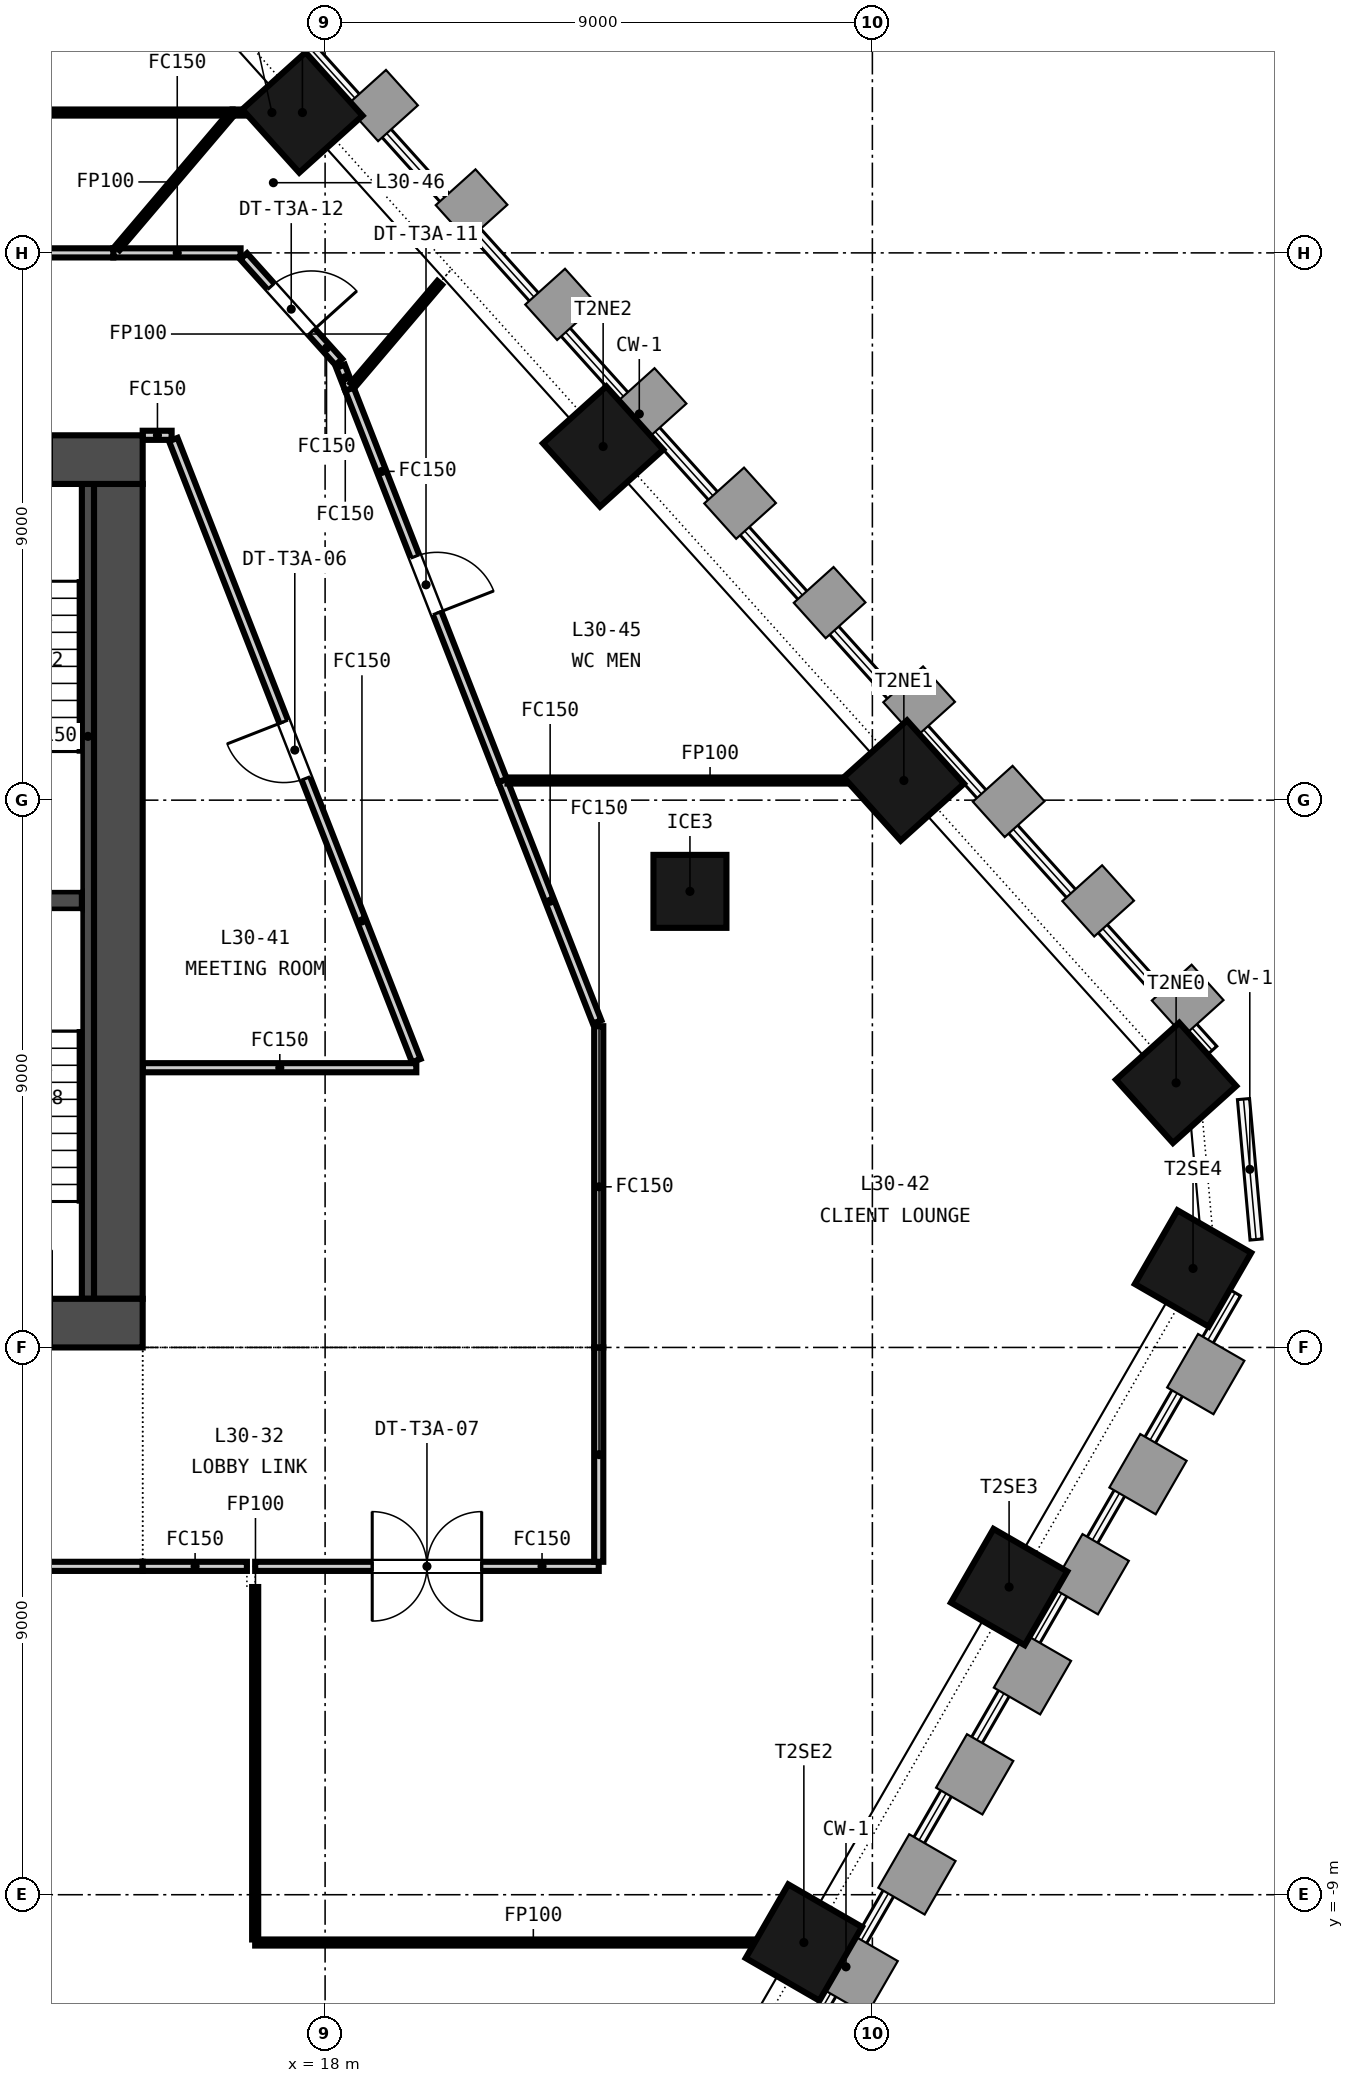
"""IFC4 building model, lengths in metres.
Left out: names, types, materials, properties, quantities, classifications, styles, units other than length and angle.
Written with IfcOpenShell. Run it as: python <this file> out.ifc"""

import sys

from ifc_helpers import new_model, si_unit, direction, frame, frame_2d, origin, origin_2d, place, context, subcontext, project, spatial, rectangle, extrude, element, fill, save


model = new_model("IFC4")
c1 = context("Model", 3, precision=1e-05, world=origin(), true_north=direction((0.0, 1.0)))
c2 = subcontext(c1, "Body", "Model", "MODEL_VIEW")
j1 = project(units=[si_unit("LENGTHUNIT", "METRE"), si_unit("PLANEANGLEUNIT", "RADIAN")], contexts=[c1])
p1 = place(None, origin())
s1 = spatial("IfcSite", under=j1, at=p1, CompositionType="ELEMENT")
p2 = place(p1, origin())
s2 = spatial("IfcBuilding", under=s1, at=p2, CompositionType="ELEMENT")
p3 = place(p2, frame((0.0, 0.0, 126.15)))
s3 = spatial("IfcBuildingStorey", under=s2, at=p3, CompositionType="ELEMENT", Elevation=126.15)
p4 = place(p3, frame((-15.0, 0.4, -0.15), z_axis=(0.0, 0.0, 1.0), x_axis=(1.0, 0.0, 0.0)))
e1 = element("IfcWall", 1, at=p4, inside=s3, PredefinedType="SOLIDWALL", context=c2, shape_type="SweptSolid", body=[
    extrude(rectangle(XDim=30.0, YDim=0.8, at=frame_2d((15.0, 0.0))), origin(), (0.0, 0.0, 1.0), 3.65),
])
p5 = place(p4, frame((5.8, 0.0, 0.15)))
e2 = element("IfcOpeningElement", 2, at=p5, cuts=e1, PredefinedType="OPENING", context=c2, shape_type="SweptSolid", body=[
    extrude(rectangle(XDim=2.4, YDim=2.4, at=frame_2d((1.2, 1.2))), frame((0.0, 0.41, 0.0), z_axis=(0.0, -1.0, 0.0), x_axis=(1.0, 0.0, 0.0)), (0.0, 0.0, 1.0), 0.82),
])
p6 = place(p4, frame((13.8, 0.0, 0.15)))
e3 = element("IfcOpeningElement", 3, at=p6, cuts=e1, PredefinedType="OPENING", context=c2, shape_type="SweptSolid", body=[
    extrude(rectangle(XDim=2.4, YDim=2.4, at=frame_2d((1.2, 1.2))), frame((0.0, 0.41, 0.0), z_axis=(0.0, -1.0, 0.0), x_axis=(1.0, 0.0, 0.0)), (0.0, 0.0, 1.0), 0.82),
])
p7 = place(p4, frame((21.8, 0.0, 0.15)))
e4 = element("IfcOpeningElement", 4, at=p7, cuts=e1, PredefinedType="OPENING", context=c2, shape_type="SweptSolid", body=[
    extrude(rectangle(XDim=2.4, YDim=2.4, at=frame_2d((1.2, 1.2))), frame((0.0, 0.41, 0.0), z_axis=(0.0, -1.0, 0.0), x_axis=(1.0, 0.0, 0.0)), (0.0, 0.0, 1.0), 0.82),
])
p8 = place(p4, frame((1.5, 0.0, 0.15)))
e5 = element("IfcOpeningElement", 5, at=p8, cuts=e1, PredefinedType="OPENING", context=c2, shape_type="SweptSolid", body=[
    extrude(rectangle(XDim=1.2, YDim=2.1, at=frame_2d((0.6, 1.05))), frame((0.0, 0.41, 0.0), z_axis=(0.0, -1.0, 0.0), x_axis=(1.0, 0.0, 0.0)), (0.0, 0.0, 1.0), 0.82),
])
p9 = place(p4, frame((27.3, 0.0, 0.15)))
e6 = element("IfcOpeningElement", 6, at=p9, cuts=e1, PredefinedType="OPENING", context=c2, shape_type="SweptSolid", body=[
    extrude(rectangle(XDim=1.2, YDim=2.1, at=frame_2d((0.6, 1.05))), frame((0.0, 0.41, 0.0), z_axis=(0.0, -1.0, 0.0), x_axis=(1.0, 0.0, 0.0)), (0.0, 0.0, 1.0), 0.82),
])
p10 = place(p3, frame((-15.0, 14.6, -0.15), z_axis=(0.0, 0.0, 1.0), x_axis=(1.0, 0.0, 0.0)))
e7 = element("IfcWall", 7, at=p10, inside=s3, PredefinedType="SOLIDWALL", context=c2, shape_type="SweptSolid", body=[
    extrude(rectangle(XDim=30.0, YDim=0.8, at=frame_2d((15.0, 0.0))), origin(), (0.0, 0.0, 1.0), 3.65),
])
p11 = place(p10, frame((9.25, 0.0, 0.15)))
e8 = element("IfcOpeningElement", 8, at=p11, cuts=e7, PredefinedType="OPENING", context=c2, shape_type="SweptSolid", body=[
    extrude(rectangle(XDim=1.5, YDim=2.1, at=frame_2d((0.75, 1.05))), frame((0.0, 0.41, 0.0), z_axis=(0.0, -1.0, 0.0), x_axis=(1.0, 0.0, 0.0)), (0.0, 0.0, 1.0), 0.82),
])
p12 = place(p10, frame((19.4, 0.0, 0.15)))
e9 = element("IfcOpeningElement", 9, at=p12, cuts=e7, PredefinedType="OPENING", context=c2, shape_type="SweptSolid", body=[
    extrude(rectangle(XDim=1.5, YDim=2.1, at=frame_2d((0.75, 1.05))), frame((0.0, 0.41, 0.0), z_axis=(0.0, -1.0, 0.0), x_axis=(1.0, 0.0, 0.0)), (0.0, 0.0, 1.0), 0.82),
])
p13 = place(p10, frame((1.5, 0.0, 0.15)))
e10 = element("IfcOpeningElement", 10, at=p13, cuts=e7, PredefinedType="OPENING", context=c2, shape_type="SweptSolid", body=[
    extrude(rectangle(XDim=1.2, YDim=2.1, at=frame_2d((0.6, 1.05))), frame((0.0, 0.41, 0.0), z_axis=(0.0, -1.0, 0.0), x_axis=(1.0, 0.0, 0.0)), (0.0, 0.0, 1.0), 0.82),
])
p14 = place(p10, frame((27.3, 0.0, 0.15)))
e11 = element("IfcOpeningElement", 11, at=p14, cuts=e7, PredefinedType="OPENING", context=c2, shape_type="SweptSolid", body=[
    extrude(rectangle(XDim=1.2, YDim=2.1, at=frame_2d((0.6, 1.05))), frame((0.0, 0.41, 0.0), z_axis=(0.0, -1.0, 0.0), x_axis=(1.0, 0.0, 0.0)), (0.0, 0.0, 1.0), 0.82),
])
p15 = place(p3, frame((14.6, 0.8, -0.15), z_axis=(0.0, 0.0, 1.0), x_axis=(0.0, 1.0, 0.0)))
e12 = element("IfcWall", 12, at=p15, inside=s3, PredefinedType="SOLIDWALL", context=c2, shape_type="SweptSolid", body=[
    extrude(rectangle(XDim=13.4, YDim=0.8, at=frame_2d((6.7, 0.0))), origin(), (0.0, 0.0, 1.0), 3.65),
])
for number, where, z_axis, x_axis in (
    (13, (25.873, -9.786, -0.15), (0.0, 0.0, 1.0), (0.5, 0.866, 0.0)),
    (14, (29.248, -3.94, -0.15), (0.0, 0.0, 1.0), (0.5, 0.866, 0.0)),
    (15, (32.273, 1.299, -0.15), (0.0, 0.0, 1.0), (0.5, 0.866, 0.0)),
    (16, (31.995, 4.351, -0.15), (0.0, 0.0, 1.0), (-0.669, 0.743, 0.0)),
    (17, (27.518, 9.323, -0.15), (0.0, 0.0, 1.0), (-0.669, 0.743, 0.0)),
    (18, (22.573, 14.816, -0.15), (0.0, 0.0, 1.0), (-0.669, 0.743, 0.0)),
    (19, (17.627, 20.308, -0.15), (0.0, 0.0, 1.0), (-0.669, 0.743, 0.0)),
):
    element("IfcColumn", number, at=place(p3, frame(where, z_axis=z_axis, x_axis=x_axis)), inside=s3, PredefinedType="COLUMN", context=c2, shape_type="SweptSolid", body=[
        extrude(rectangle(XDim=1.4, YDim=1.4, at=origin_2d()), origin(), (0.0, 0.0, 1.0), 3.65),
    ])
p16 = place(p3, frame((24.0, 7.5, -0.15), z_axis=(0.0, 0.0, 1.0), x_axis=(1.0, 0.0, 0.0)))
e20 = element("IfcColumn", 20, at=p16, inside=s3, PredefinedType="COLUMN", context=c2, shape_type="SweptSolid", body=[
    extrude(rectangle(XDim=1.2, YDim=1.2, at=origin_2d()), origin(), (0.0, 0.0, 1.0), 3.65),
])
p17 = place(p3, frame((11.05, 7.35, 0.0), z_axis=(0.0, 0.0, 1.0), x_axis=(1.0, 0.0, 0.0)))
e21 = element("IfcWall", 21, at=p17, inside=s3, PredefinedType="SOLIDWALL", context=c2, shape_type="SweptSolid", body=[
    extrude(rectangle(XDim=2.95, YDim=0.3, at=frame_2d((1.475, 0.0))), origin(), (0.0, 0.0, 1.0), 3.5),
])
p18 = place(p3, frame((14.1, 0.8, 0.0), z_axis=(0.0, 0.0, 1.0), x_axis=(0.0, 1.0, 0.0)))
e22 = element("IfcWall", 22, at=p18, inside=s3, PredefinedType="SOLIDWALL", context=c2, shape_type="SweptSolid", body=[
    extrude(rectangle(XDim=13.4, YDim=0.2, at=frame_2d((6.7, 0.0))), origin(), (0.0, 0.0, 1.0), 3.5),
])
p19 = place(p3, frame((15.0, -3.6, 0.0), z_axis=(0.0, 0.0, 1.0), x_axis=(-1.0, 0.0, 0.0)))
e23 = element("IfcWall", 23, at=p19, inside=s3, PredefinedType="PARTITIONING", context=c2, shape_type="SweptSolid", body=[
    extrude(rectangle(XDim=30.0, YDim=0.15, at=frame_2d((15.0, 0.0))), origin(), (0.0, 0.0, 1.0), 2.741),
])
p20 = place(p19, frame((14.1, 0.0, 0.0)))
e24 = element("IfcOpeningElement", 24, at=p20, cuts=e23, PredefinedType="OPENING", context=c2, shape_type="SweptSolid", body=[
    extrude(rectangle(XDim=1.8, YDim=2.1, at=frame_2d((0.9, 1.05))), frame((0.0, 0.085, 0.0), z_axis=(0.0, -1.0, 0.0), x_axis=(1.0, 0.0, 0.0)), (0.0, 0.0, 1.0), 0.17),
])
p21 = place(p3, frame((22.5, -3.6, 0.0), z_axis=(0.0, 0.0, 1.0), x_axis=(-1.0, 0.0, 0.0)))
e25 = element("IfcWall", 25, at=p21, inside=s3, PredefinedType="PARTITIONING", context=c2, shape_type="SweptSolid", body=[
    extrude(rectangle(XDim=5.65, YDim=0.15, at=frame_2d((2.825, 0.0))), origin(), (0.0, 0.0, 1.0), 2.741),
])
p22 = place(p21, frame((1.925, 0.0, 0.0)))
e26 = element("IfcOpeningElement", 26, at=p22, cuts=e25, PredefinedType="OPENING", context=c2, shape_type="SweptSolid", body=[
    extrude(rectangle(XDim=1.8, YDim=2.1, at=frame_2d((0.9, 1.05))), frame((0.0, 0.085, 0.0), z_axis=(0.0, -1.0, 0.0), x_axis=(1.0, 0.0, 0.0)), (0.0, 0.0, 1.0), 0.17),
])
p23 = place(p3, frame((22.5, 0.0, 0.0), z_axis=(0.0, 0.0, 1.0), x_axis=(0.0, -1.0, 0.0)))
e27 = element("IfcWall", 27, at=p23, inside=s3, PredefinedType="PARTITIONING", context=c2, shape_type="SweptSolid", body=[
    extrude(rectangle(XDim=3.525, YDim=0.15, at=frame_2d((1.762, 0.0))), origin(), (0.0, 0.0, 1.0), 2.741),
])
p24 = place(p3, frame((16.714, -3.6, 0.0), z_axis=(0.0, 0.0, 1.0), x_axis=(-1.0, 0.0, 0.0)))
e28 = element("IfcWall", 28, at=p24, inside=s3, PredefinedType="PARTITIONING", context=c2, shape_type="SweptSolid", body=[
    extrude(rectangle(XDim=1.714, YDim=0.15, at=frame_2d((0.857, 0.0))), origin(), (0.0, 0.0, 1.0), 2.741),
])
p25 = place(p3, frame((15.476, 15.0, 0.0), z_axis=(0.0, 0.0, 1.0), x_axis=(-1.0, 0.0, 0.0)))
e29 = element("IfcWall", 29, at=p25, inside=s3, PredefinedType="PARTITIONING", context=c2, shape_type="SweptSolid", body=[
    extrude(rectangle(XDim=0.476, YDim=0.15, at=frame_2d((0.238, 0.0))), origin(), (0.0, 0.0, 1.0), 2.741),
])
p26 = place(p3, frame((19.5, 4.717, 0.0), z_axis=(0.0, 0.0, 1.0), x_axis=(-0.364410260026, 0.931238509936, 0.0)))
e30 = element("IfcWall", 30, at=p26, inside=s3, PredefinedType="PARTITIONING", context=c2, shape_type="SweptSolid", body=[
    extrude(rectangle(XDim=10.967, YDim=0.15, at=frame_2d((5.484, 0.0))), origin(), (0.0, 0.0, 1.0), 2.741),
])
p27 = place(p26, frame((4.984, 0.0, 0.0)))
e31 = element("IfcOpeningElement", 31, at=p27, cuts=e30, PredefinedType="OPENING", context=c2, shape_type="SweptSolid", body=[
    extrude(rectangle(XDim=1.0, YDim=2.1, at=frame_2d((0.5, 1.05))), frame((0.0, 0.085, 0.0), z_axis=(0.0, -1.0, 0.0), x_axis=(1.0, 0.0, 0.0)), (0.0, 0.0, 1.0), 0.17),
])
p28 = place(p3, frame((22.5, 5.283, 0.0), z_axis=(0.0, 0.0, 1.0), x_axis=(0.0, -1.0, 0.0)))
e32 = element("IfcWall", 32, at=p28, inside=s3, PredefinedType="PARTITIONING", context=c2, shape_type="SweptSolid", body=[
    extrude(rectangle(XDim=5.283, YDim=0.15, at=frame_2d((2.642, 0.0))), origin(), (0.0, 0.0, 1.0), 2.741),
])
p29 = place(p3, frame((16.479, 20.308, 0.0), z_axis=(0.0, 0.0, 1.0), x_axis=(1.0, 0.0, 0.0)))
e33 = element("IfcWall", 33, at=p29, inside=s3, PredefinedType="PARTITIONING", context=c2, shape_type="SweptSolid", body=[
    extrude(rectangle(XDim=1.283, YDim=0.1, at=frame_2d((0.642, 0.0))), origin(), (0.0, 0.0, 1.0), 2.741),
])
p30 = place(p3, frame((8.075, 20.308, 0.0), z_axis=(0.0, 0.0, 1.0), x_axis=(1.0, 0.0, 0.0)))
e34 = element("IfcWall", 34, at=p30, inside=s3, PredefinedType="PARTITIONING", context=c2, shape_type="SweptSolid", body=[
    extrude(rectangle(XDim=8.404, YDim=0.1, at=frame_2d((4.202, 0.0))), origin(), (0.0, 0.0, 1.0), 2.741),
])
p31 = place(p3, frame((15.0, 4.6, 0.0), z_axis=(0.0, 0.0, 1.0), x_axis=(1.0, 0.0, 0.0)))
e35 = element("IfcWall", 35, at=p31, inside=s3, PredefinedType="PARTITIONING", context=c2, shape_type="SweptSolid", body=[
    extrude(rectangle(XDim=4.5, YDim=0.15, at=frame_2d((2.25, 0.0))), origin(), (0.0, 0.0, 1.0), 2.741),
])
p32 = place(p3, frame((20.919, 9.323, 0.0), z_axis=(0.0, 0.0, 1.0), x_axis=(0.364429576393, -0.931230950865, 0.0)))
e36 = element("IfcWall", 36, at=p32, inside=s3, PredefinedType="PARTITIONING", context=c2, shape_type="SweptSolid", body=[
    extrude(rectangle(XDim=4.263, YDim=0.15, at=frame_2d((2.132, 0.0))), origin(), (0.0, 0.0, 1.0), 2.741),
])
p33 = place(p3, frame((16.85, -9.786, 0.0), z_axis=(0.0, 0.0, 1.0), x_axis=(1.0, 0.0, 0.0)))
e37 = element("IfcWall", 37, at=p33, inside=s3, PredefinedType="PARTITIONING", context=c2, shape_type="SweptSolid", body=[
    extrude(rectangle(XDim=9.139, YDim=0.1, at=frame_2d((4.569, 0.0))), origin(), (0.0, 0.0, 1.0), 2.741),
])
p34 = place(p3, frame((16.85, -9.736, 0.0), z_axis=(0.0, 0.0, 1.0), x_axis=(0.0, 1.0, 0.0)))
e38 = element("IfcWall", 38, at=p34, inside=s3, PredefinedType="PARTITIONING", context=c2, shape_type="SweptSolid", body=[
    extrude(rectangle(XDim=5.796, YDim=0.1, at=frame_2d((2.898, 0.0))), origin(), (0.0, 0.0, 1.0), 2.741),
])
p35 = place(p3, frame((18.4, 15.76, 0.0), z_axis=(0.0, 0.0, 1.0), x_axis=(0.364425982763, -0.931232357195, 0.0)))
e39 = element("IfcWall", 39, at=p35, inside=s3, PredefinedType="PARTITIONING", context=c2, shape_type="SweptSolid", body=[
    extrude(rectangle(XDim=6.912, YDim=0.15, at=frame_2d((3.456, 0.0))), origin(), (0.0, 0.0, 1.0), 2.741),
])
p36 = place(p35, frame((2.956, 0.0, 0.0)))
e40 = element("IfcOpeningElement", 40, at=p36, cuts=e39, PredefinedType="OPENING", context=c2, shape_type="SweptSolid", body=[
    extrude(rectangle(XDim=1.0, YDim=2.1, at=frame_2d((0.5, 1.05))), frame((0.0, 0.085, 0.0), z_axis=(0.0, -1.0, 0.0), x_axis=(1.0, 0.0, 0.0)), (0.0, 0.0, 1.0), 0.17),
])
p37 = place(p3, frame((21.0, 9.323, 0.0), z_axis=(0.0, 0.0, 1.0), x_axis=(1.0, 0.0, 0.0)))
e41 = element("IfcWall", 41, at=p37, inside=s3, PredefinedType="PARTITIONING", context=c2, shape_type="SweptSolid", body=[
    extrude(rectangle(XDim=6.653, YDim=0.1, at=frame_2d((3.326, 0.0))), origin(), (0.0, 0.0, 1.0), 2.741),
])
p38 = place(p3, frame((14.517, 18.0, 0.0), z_axis=(0.0, 0.0, 1.0), x_axis=(1.0, 0.0, 0.0)))
e42 = element("IfcWall", 42, at=p38, inside=s3, PredefinedType="PARTITIONING", context=c2, shape_type="SweptSolid", body=[
    extrude(rectangle(XDim=2.093, YDim=0.15, at=frame_2d((1.046, 0.0))), origin(), (0.0, 0.0, 1.0), 2.741),
])
p39 = place(p3, frame((16.66, 17.944, 0.0), z_axis=(0.0, 0.0, 1.0), x_axis=(0.669103043777, -0.743169642012, 0.0)))
e43 = element("IfcWall", 43, at=p39, inside=s3, PredefinedType="PARTITIONING", context=c2, shape_type="SweptSolid", body=[
    extrude(rectangle(XDim=2.34, YDim=0.15, at=frame_2d((1.17, 0.0))), origin(), (0.0, 0.0, 1.0), 2.741),
])
p40 = place(p39, frame((0.67, 0.0, 0.0)))
e44 = element("IfcOpeningElement", 44, at=p40, cuts=e43, PredefinedType="OPENING", context=c2, shape_type="SweptSolid", body=[
    extrude(rectangle(XDim=1.0, YDim=2.1, at=frame_2d((0.5, 1.05))), frame((0.0, 0.085, 0.0), z_axis=(0.0, -1.0, 0.0), x_axis=(1.0, 0.0, 0.0)), (0.0, 0.0, 1.0), 0.17),
])
p41 = place(p3, frame((18.253, 16.135, 0.0), z_axis=(0.0, 0.0, 1.0), x_axis=(0.36385052714, -0.93145734948, 0.0)))
e45 = element("IfcWall", 45, at=p41, inside=s3, PredefinedType="PARTITIONING", context=c2, shape_type="SweptSolid", body=[
    extrude(rectangle(XDim=0.403, YDim=0.15, at=frame_2d((0.201, 0.0))), origin(), (0.0, 0.0, 1.0), 2.741),
])
p42 = place(p3, frame((18.455, 15.825, 0.0), z_axis=(0.0, 0.0, 1.0), x_axis=(0.647780060511, 0.761827403815, 0.0)))
e46 = element("IfcWall", 46, at=p42, inside=s3, PredefinedType="PARTITIONING", context=c2, shape_type="SweptSolid", body=[
    extrude(rectangle(XDim=2.207, YDim=0.1, at=frame_2d((1.104, 0.0))), origin(), (0.0, 0.0, 1.0), 2.741),
])
p43 = place(p3, frame((8.075, 18.0, 0.0), z_axis=(0.0, 0.0, 1.0), x_axis=(1.0, 0.0, 0.0)))
e47 = element("IfcWall", 47, at=p43, inside=s3, PredefinedType="PARTITIONING", context=c2, shape_type="SweptSolid", body=[
    extrude(rectangle(XDim=6.442, YDim=0.15, at=frame_2d((3.221, 0.0))), origin(), (0.0, 0.0, 1.0), 2.741),
])
p44 = place(p43, frame((2.721, 0.0, 0.0)))
e48 = element("IfcOpeningElement", 48, at=p44, cuts=e47, PredefinedType="OPENING", context=c2, shape_type="SweptSolid", body=[
    extrude(rectangle(XDim=1.0, YDim=2.1, at=frame_2d((0.5, 1.05))), frame((0.0, 0.085, 0.0), z_axis=(0.0, -1.0, 0.0), x_axis=(1.0, 0.0, 0.0)), (0.0, 0.0, 1.0), 0.17),
])
p45 = place(p3, frame((14.581, 18.075, 0.0), z_axis=(0.0, 0.0, 1.0), x_axis=(0.6476632602, 0.761926703422, 0.0)))
e49 = element("IfcWall", 49, at=p45, inside=s3, PredefinedType="PARTITIONING", context=c2, shape_type="SweptSolid", body=[
    extrude(rectangle(XDim=2.865, YDim=0.1, at=frame_2d((1.433, 0.0))), origin(), (0.0, 0.0, 1.0), 2.741),
])
p46 = place(p27, origin())
e50 = element("IfcDoor", 50, at=p46, inside=s3, OperationType="SINGLE_SWING_RIGHT", PredefinedType="DOOR", context=c2, shape_type="SweptSolid", body=[
    extrude(rectangle(XDim=1.0, YDim=2.1, at=frame_2d((0.5, 1.05))), frame((0.0, 0.025, 0.0), z_axis=(0.0, -1.0, 0.0), x_axis=(1.0, 0.0, 0.0)), (0.0, 0.0, 1.0), 0.05),
])
fill(e31, e50)
p47 = place(p22, origin())
e51 = element("IfcDoor", 51, at=p47, inside=s3, OperationType="DOUBLE_DOOR_DOUBLE_SWING", PredefinedType="DOOR", context=c2, shape_type="SweptSolid", body=[
    extrude(rectangle(XDim=1.8, YDim=2.1, at=frame_2d((0.9, 1.05))), frame((0.0, 0.025, 0.0), z_axis=(0.0, -1.0, 0.0), x_axis=(1.0, 0.0, 0.0)), (0.0, 0.0, 1.0), 0.05),
])
fill(e26, e51)
p48 = place(p36, origin())
e52 = element("IfcDoor", 52, at=p48, inside=s3, OperationType="SINGLE_SWING_RIGHT", PredefinedType="DOOR", context=c2, shape_type="SweptSolid", body=[
    extrude(rectangle(XDim=1.0, YDim=2.1, at=frame_2d((0.5, 1.05))), frame((0.0, 0.025, 0.0), z_axis=(0.0, -1.0, 0.0), x_axis=(1.0, 0.0, 0.0)), (0.0, 0.0, 1.0), 0.05),
])
fill(e40, e52)
p49 = place(p40, origin())
e53 = element("IfcDoor", 53, at=p49, inside=s3, OperationType="SINGLE_SWING_RIGHT", PredefinedType="DOOR", context=c2, shape_type="SweptSolid", body=[
    extrude(rectangle(XDim=1.0, YDim=2.1, at=frame_2d((0.5, 1.05))), frame((0.0, 0.025, 0.0), z_axis=(0.0, -1.0, 0.0), x_axis=(1.0, 0.0, 0.0)), (0.0, 0.0, 1.0), 0.05),
])
fill(e44, e53)
save(model, sys.argv[1])
